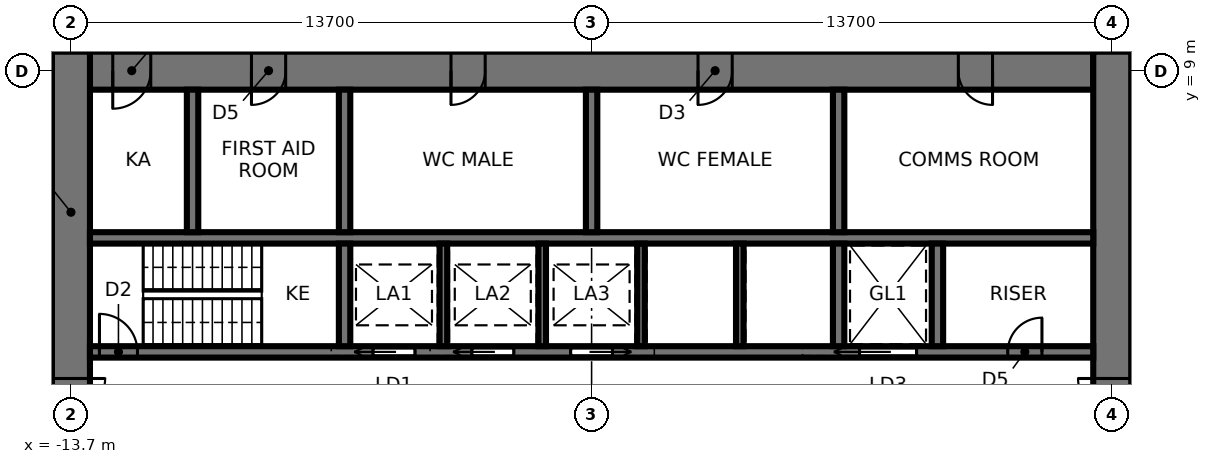
"""IFC4 building model, lengths in metres.
Left out: names, types, materials, properties, quantities, classifications, styles, units other than length and angle.
Written with IfcOpenShell. Run it as: python <this file> out.ifc"""

import sys

from ifc_helpers import new_model, si_unit, direction, frame, frame_2d, origin, place, context, subcontext, project, spatial, rectangle, extrude, element, fill, save


model = new_model("IFC4")
c1 = context("Model", 3, precision=1e-05, world=origin(), true_north=direction((0.0, 1.0)))
c2 = subcontext(c1, "Body", "Model", "MODEL_VIEW")
j1 = project(units=[si_unit("LENGTHUNIT", "METRE"), si_unit("PLANEANGLEUNIT", "RADIAN")], contexts=[c1])
p1 = place(None, origin())
s1 = spatial("IfcSite", under=j1, at=p1, CompositionType="ELEMENT")
p2 = place(p1, origin())
s2 = spatial("IfcBuilding", under=s1, at=p2, CompositionType="ELEMENT")
p3 = place(p2, frame((0.0, 0.0, 10.6)))
s3 = spatial("IfcBuildingStorey", under=s2, at=p3, CompositionType="ELEMENT", Elevation=10.6)
p4 = place(p3, frame((13.2, 9.0, 0.0), z_axis=(0.0, 0.0, 1.0), x_axis=(-1.0, 0.0, 0.0)))
e1 = element("IfcWall", 1, at=p4, inside=s3, PredefinedType="SHEAR", context=c2, shape_type="SweptSolid", body=[
    extrude(rectangle(XDim=26.4, YDim=1.0, at=frame_2d((13.2, 0.0))), origin(), (0.0, 0.0, 1.0), 4.5),
])
p5 = place(p4, frame((2.65, 0.0, 0.0)))
e2 = element("IfcOpeningElement", 2, at=p5, cuts=e1, PredefinedType="OPENING", context=c2, shape_type="SweptSolid", body=[
    extrude(rectangle(XDim=0.9, YDim=2.1, at=frame_2d((0.45, 1.05))), frame((0.0, 0.51, 0.0), z_axis=(0.0, -1.0, 0.0), x_axis=(1.0, 0.0, 0.0)), (0.0, 0.0, 1.0), 1.02),
])
p6 = place(p4, frame((9.5, 0.0, 0.0)))
e3 = element("IfcOpeningElement", 3, at=p6, cuts=e1, PredefinedType="OPENING", context=c2, shape_type="SweptSolid", body=[
    extrude(rectangle(XDim=0.9, YDim=2.1, at=frame_2d((0.45, 1.05))), frame((0.0, 0.51, 0.0), z_axis=(0.0, -1.0, 0.0), x_axis=(1.0, 0.0, 0.0)), (0.0, 0.0, 1.0), 1.02),
])
p7 = place(p4, frame((16.0, 0.0, 0.0)))
e4 = element("IfcOpeningElement", 4, at=p7, cuts=e1, PredefinedType="OPENING", context=c2, shape_type="SweptSolid", body=[
    extrude(rectangle(XDim=0.9, YDim=2.1, at=frame_2d((0.45, 1.05))), frame((0.0, 0.51, 0.0), z_axis=(0.0, -1.0, 0.0), x_axis=(1.0, 0.0, 0.0)), (0.0, 0.0, 1.0), 1.02),
])
p8 = place(p4, frame((21.25, 0.0, 0.0)))
e5 = element("IfcOpeningElement", 5, at=p8, cuts=e1, PredefinedType="OPENING", context=c2, shape_type="SweptSolid", body=[
    extrude(rectangle(XDim=0.9, YDim=2.1, at=frame_2d((0.45, 1.05))), frame((0.0, 0.51, 0.0), z_axis=(0.0, -1.0, 0.0), x_axis=(1.0, 0.0, 0.0)), (0.0, 0.0, 1.0), 1.02),
])
p9 = place(p4, frame((24.8, 0.0, 0.0)))
e6 = element("IfcOpeningElement", 6, at=p9, cuts=e1, PredefinedType="OPENING", context=c2, shape_type="SweptSolid", body=[
    extrude(rectangle(XDim=1.0, YDim=2.1, at=frame_2d((0.5, 1.05))), frame((0.0, 0.51, 0.0), z_axis=(0.0, -1.0, 0.0), x_axis=(1.0, 0.0, 0.0)), (0.0, 0.0, 1.0), 1.02),
])
p10 = place(p3, frame((13.7, -9.5, 0.0), z_axis=(0.0, 0.0, 1.0), x_axis=(0.0, 1.0, 0.0)))
e7 = element("IfcWall", 7, at=p10, inside=s3, PredefinedType="SHEAR", context=c2, shape_type="SweptSolid", body=[
    extrude(rectangle(XDim=19.0, YDim=1.0, at=frame_2d((9.5, 0.0))), origin(), (0.0, 0.0, 1.0), 4.5),
])
p11 = place(p10, frame((8.6, 0.0, 0.0)))
e8 = element("IfcOpeningElement", 8, at=p11, cuts=e7, PredefinedType="OPENING", context=c2, shape_type="SweptSolid", body=[
    extrude(rectangle(XDim=1.8, YDim=2.4, at=frame_2d((0.9, 1.2))), frame((0.0, 0.51, 0.0), z_axis=(0.0, -1.0, 0.0), x_axis=(1.0, 0.0, 0.0)), (0.0, 0.0, 1.0), 1.02),
])
p12 = place(p3, frame((-13.7, 9.5, 0.0), z_axis=(0.0, 0.0, 1.0), x_axis=(0.0, -1.0, 0.0)))
e9 = element("IfcWall", 9, at=p12, inside=s3, PredefinedType="SHEAR", context=c2, shape_type="SweptSolid", body=[
    extrude(rectangle(XDim=19.0, YDim=1.0, at=frame_2d((9.5, 0.0))), origin(), (0.0, 0.0, 1.0), 4.5),
])
p13 = place(p12, frame((8.6, 0.0, 0.0)))
e10 = element("IfcOpeningElement", 10, at=p13, cuts=e9, PredefinedType="OPENING", context=c2, shape_type="SweptSolid", body=[
    extrude(rectangle(XDim=1.8, YDim=2.4, at=frame_2d((0.9, 1.2))), frame((0.0, 0.51, 0.0), z_axis=(0.0, -1.0, 0.0), x_axis=(1.0, 0.0, 0.0)), (0.0, 0.0, 1.0), 1.02),
])
p14 = place(p3, frame((-13.2, 1.6, 0.0), z_axis=(0.0, 0.0, 1.0), x_axis=(1.0, 0.0, 0.0)))
e11 = element("IfcWall", 11, at=p14, inside=s3, PredefinedType="SHEAR", context=c2, shape_type="SweptSolid", body=[
    extrude(rectangle(XDim=26.4, YDim=0.3, at=frame_2d((13.2, 0.0))), origin(), (0.0, 0.0, 1.0), 4.5),
])
p15 = place(p14, frame((0.25, 0.0, 0.0)))
e12 = element("IfcOpeningElement", 12, at=p15, cuts=e11, PredefinedType="OPENING", context=c2, shape_type="SweptSolid", body=[
    extrude(rectangle(XDim=1.0, YDim=2.1, at=frame_2d((0.5, 1.05))), frame((0.0, 0.16, 0.0), z_axis=(0.0, -1.0, 0.0), x_axis=(1.0, 0.0, 0.0)), (0.0, 0.0, 1.0), 0.32),
])
p16 = place(p14, frame((20.25, 0.0, 0.0)))
e13 = element("IfcOpeningElement", 13, at=p16, cuts=e11, PredefinedType="OPENING", context=c2, shape_type="SweptSolid", body=[
    extrude(rectangle(XDim=1.5, YDim=2.4, at=frame_2d((0.75, 1.2))), frame((0.0, 0.16, 0.0), z_axis=(0.0, -1.0, 0.0), x_axis=(1.0, 0.0, 0.0)), (0.0, 0.0, 1.0), 0.32),
])
p17 = place(p14, frame((7.45, 0.0, 0.0)))
e14 = element("IfcOpeningElement", 14, at=p17, cuts=e11, PredefinedType="OPENING", context=c2, shape_type="SweptSolid", body=[
    extrude(rectangle(XDim=1.1, YDim=2.3, at=frame_2d((0.55, 1.15))), frame((0.0, 0.16, 0.0), z_axis=(0.0, -1.0, 0.0), x_axis=(1.0, 0.0, 0.0)), (0.0, 0.0, 1.0), 0.32),
])
p18 = place(p14, frame((10.05, 0.0, 0.0)))
e15 = element("IfcOpeningElement", 15, at=p18, cuts=e11, PredefinedType="OPENING", context=c2, shape_type="SweptSolid", body=[
    extrude(rectangle(XDim=1.1, YDim=2.3, at=frame_2d((0.55, 1.15))), frame((0.0, 0.16, 0.0), z_axis=(0.0, -1.0, 0.0), x_axis=(1.0, 0.0, 0.0)), (0.0, 0.0, 1.0), 0.32),
])
p19 = place(p14, frame((12.65, 0.0, 0.0)))
e16 = element("IfcOpeningElement", 16, at=p19, cuts=e11, PredefinedType="OPENING", context=c2, shape_type="SweptSolid", body=[
    extrude(rectangle(XDim=1.1, YDim=2.3, at=frame_2d((0.55, 1.15))), frame((0.0, 0.16, 0.0), z_axis=(0.0, -1.0, 0.0), x_axis=(1.0, 0.0, 0.0)), (0.0, 0.0, 1.0), 0.32),
])
p20 = place(p14, frame((24.15, 0.0, 0.0)))
e17 = element("IfcOpeningElement", 17, at=p20, cuts=e11, PredefinedType="OPENING", context=c2, shape_type="SweptSolid", body=[
    extrude(rectangle(XDim=0.9, YDim=2.1, at=frame_2d((0.45, 1.05))), frame((0.0, 0.16, 0.0), z_axis=(0.0, -1.0, 0.0), x_axis=(1.0, 0.0, 0.0)), (0.0, 0.0, 1.0), 0.32),
])
p21 = place(p3, frame((-13.2, 4.6, 0.0), z_axis=(0.0, 0.0, 1.0), x_axis=(1.0, 0.0, 0.0)))
e18 = element("IfcWall", 18, at=p21, inside=s3, PredefinedType="SHEAR", context=c2, shape_type="SweptSolid", body=[
    extrude(rectangle(XDim=26.4, YDim=0.3, at=frame_2d((13.2, 0.0))), origin(), (0.0, 0.0, 1.0), 4.5),
])
p22 = place(p3, frame((-6.5, 1.75, 0.0), z_axis=(0.0, 0.0, 1.0), x_axis=(0.0, 1.0, 0.0)))
e19 = element("IfcWall", 19, at=p22, inside=s3, PredefinedType="SHEAR", context=c2, shape_type="SweptSolid", body=[
    extrude(rectangle(XDim=2.7, YDim=0.3, at=frame_2d((1.35, 0.0))), origin(), (0.0, 0.0, 1.0), 4.5),
])
p23 = place(p3, frame((-6.5, 4.75, 0.0), z_axis=(0.0, 0.0, 1.0), x_axis=(0.0, 1.0, 0.0)))
e20 = element("IfcWall", 20, at=p23, inside=s3, PredefinedType="SHEAR", context=c2, shape_type="SweptSolid", body=[
    extrude(rectangle(XDim=3.75, YDim=0.3, at=frame_2d((1.875, 0.0))), origin(), (0.0, 0.0, 1.0), 4.5),
])
p24 = place(p3, frame((6.5, 1.75, 0.0), z_axis=(0.0, 0.0, 1.0), x_axis=(0.0, 1.0, 0.0)))
e21 = element("IfcWall", 21, at=p24, inside=s3, PredefinedType="SHEAR", context=c2, shape_type="SweptSolid", body=[
    extrude(rectangle(XDim=2.7, YDim=0.3, at=frame_2d((1.35, 0.0))), origin(), (0.0, 0.0, 1.0), 4.5),
])
p25 = place(p3, frame((6.5, 4.75, 0.0), z_axis=(0.0, 0.0, 1.0), x_axis=(0.0, 1.0, 0.0)))
e22 = element("IfcWall", 22, at=p25, inside=s3, PredefinedType="SHEAR", context=c2, shape_type="SweptSolid", body=[
    extrude(rectangle(XDim=3.75, YDim=0.3, at=frame_2d((1.875, 0.0))), origin(), (0.0, 0.0, 1.0), 4.5),
])
for number, where, z_axis, x_axis in (
    (23, (-3.9, 1.75, 0.0), (0.0, 0.0, 1.0), (0.0, 1.0, 0.0)),
    (24, (-1.3, 1.75, 0.0), (0.0, 0.0, 1.0), (0.0, 1.0, 0.0)),
    (25, (1.3, 1.75, 0.0), (0.0, 0.0, 1.0), (0.0, 1.0, 0.0)),
    (26, (3.9, 1.75, 0.0), (0.0, 0.0, 1.0), (0.0, 1.0, 0.0)),
):
    element("IfcWall", number, at=place(p3, frame(where, z_axis=z_axis, x_axis=x_axis)), inside=s3, PredefinedType="SHEAR", context=c2, shape_type="SweptSolid", body=[
        extrude(rectangle(XDim=2.7, YDim=0.2, at=frame_2d((1.35, 0.0))), origin(), (0.0, 0.0, 1.0), 4.5),
    ])
for number, where, z_axis, x_axis in (
    (27, (0.0, 4.75, 0.0), (0.0, 0.0, 1.0), (0.0, 1.0, 0.0)),
    (28, (-10.5, 4.75, 0.0), (0.0, 0.0, 1.0), (0.0, 1.0, 0.0)),
):
    element("IfcWall", number, at=place(p3, frame(where, z_axis=z_axis, x_axis=x_axis)), inside=s3, PredefinedType="SHEAR", context=c2, shape_type="SweptSolid", body=[
        extrude(rectangle(XDim=3.75, YDim=0.3, at=frame_2d((1.875, 0.0))), origin(), (0.0, 0.0, 1.0), 4.5),
    ])
p26 = place(p3, frame((9.1, 1.75, 0.0), z_axis=(0.0, 0.0, 1.0), x_axis=(0.0, 1.0, 0.0)))
e29 = element("IfcWall", 29, at=p26, inside=s3, PredefinedType="SHEAR", context=c2, shape_type="SweptSolid", body=[
    extrude(rectangle(XDim=2.7, YDim=0.3, at=frame_2d((1.35, 0.0))), origin(), (0.0, 0.0, 1.0), 4.5),
])
p27 = place(p13, origin())
e30 = element("IfcDoor", 30, at=p27, inside=s3, OperationType="DOUBLE_DOOR_SINGLE_SWING", PredefinedType="DOOR", context=c2, shape_type="SweptSolid", body=[
    extrude(rectangle(XDim=1.72, YDim=2.36, at=frame_2d((0.9, 1.18))), frame((0.0, 0.025, 0.0), z_axis=(0.0, -1.0, 0.0), x_axis=(1.0, 0.0, 0.0)), (0.0, 0.0, 1.0), 0.05),
    extrude(rectangle(XDim=0.04, YDim=2.4, at=frame_2d((0.02, 1.2))), frame((0.0, 0.25, 0.0), z_axis=(0.0, -1.0, 0.0), x_axis=(1.0, 0.0, 0.0)), (0.0, 0.0, 1.0), 0.5),
    extrude(rectangle(XDim=0.04, YDim=2.4, at=frame_2d((1.78, 1.2))), frame((0.0, 0.25, 0.0), z_axis=(0.0, -1.0, 0.0), x_axis=(1.0, 0.0, 0.0)), (0.0, 0.0, 1.0), 0.5),
    extrude(rectangle(XDim=1.72, YDim=0.04, at=frame_2d((0.9, 2.38))), frame((0.0, 0.25, 0.0), z_axis=(0.0, -1.0, 0.0), x_axis=(1.0, 0.0, 0.0)), (0.0, 0.0, 1.0), 0.5),
])
fill(e10, e30)
p28 = place(p11, origin())
e31 = element("IfcDoor", 31, at=p28, inside=s3, OperationType="DOUBLE_DOOR_SINGLE_SWING", PredefinedType="DOOR", context=c2, shape_type="SweptSolid", body=[
    extrude(rectangle(XDim=1.72, YDim=2.36, at=frame_2d((0.9, 1.18))), frame((0.0, 0.025, 0.0), z_axis=(0.0, -1.0, 0.0), x_axis=(1.0, 0.0, 0.0)), (0.0, 0.0, 1.0), 0.05),
    extrude(rectangle(XDim=0.04, YDim=2.4, at=frame_2d((0.02, 1.2))), frame((0.0, 0.25, 0.0), z_axis=(0.0, -1.0, 0.0), x_axis=(1.0, 0.0, 0.0)), (0.0, 0.0, 1.0), 0.5),
    extrude(rectangle(XDim=0.04, YDim=2.4, at=frame_2d((1.78, 1.2))), frame((0.0, 0.25, 0.0), z_axis=(0.0, -1.0, 0.0), x_axis=(1.0, 0.0, 0.0)), (0.0, 0.0, 1.0), 0.5),
    extrude(rectangle(XDim=1.72, YDim=0.04, at=frame_2d((0.9, 2.38))), frame((0.0, 0.25, 0.0), z_axis=(0.0, -1.0, 0.0), x_axis=(1.0, 0.0, 0.0)), (0.0, 0.0, 1.0), 0.5),
])
fill(e8, e31)
p29 = place(p15, origin())
e32 = element("IfcDoor", 32, at=p29, inside=s3, OperationType="SINGLE_SWING_LEFT", PredefinedType="DOOR", context=c2, shape_type="SweptSolid", body=[
    extrude(rectangle(XDim=1.0, YDim=2.1, at=frame_2d((0.5, 1.05))), frame((0.0, 0.025, 0.0), z_axis=(0.0, -1.0, 0.0), x_axis=(1.0, 0.0, 0.0)), (0.0, 0.0, 1.0), 0.05),
])
fill(e12, e32)
p30 = place(p16, origin())
e33 = element("IfcDoor", 33, at=p30, inside=s3, OperationType="SLIDING_TO_LEFT", PredefinedType="DOOR", context=c2, shape_type="SweptSolid", body=[
    extrude(rectangle(XDim=1.5, YDim=2.4, at=frame_2d((0.75, 1.2))), frame((0.0, 0.025, 0.0), z_axis=(0.0, -1.0, 0.0), x_axis=(1.0, 0.0, 0.0)), (0.0, 0.0, 1.0), 0.05),
])
fill(e13, e33)
p31 = place(p17, origin())
e34 = element("IfcDoor", 34, at=p31, inside=s3, OperationType="SLIDING_TO_LEFT", PredefinedType="DOOR", context=c2, shape_type="SweptSolid", body=[
    extrude(rectangle(XDim=1.1, YDim=2.3, at=frame_2d((0.55, 1.15))), frame((0.0, 0.025, 0.0), z_axis=(0.0, -1.0, 0.0), x_axis=(1.0, 0.0, 0.0)), (0.0, 0.0, 1.0), 0.05),
])
fill(e14, e34)
p32 = place(p18, origin())
e35 = element("IfcDoor", 35, at=p32, inside=s3, OperationType="SLIDING_TO_LEFT", PredefinedType="DOOR", context=c2, shape_type="SweptSolid", body=[
    extrude(rectangle(XDim=1.1, YDim=2.3, at=frame_2d((0.55, 1.15))), frame((0.0, 0.025, 0.0), z_axis=(0.0, -1.0, 0.0), x_axis=(1.0, 0.0, 0.0)), (0.0, 0.0, 1.0), 0.05),
])
fill(e15, e35)
p33 = place(p19, origin())
e36 = element("IfcDoor", 36, at=p33, inside=s3, OperationType="SLIDING_TO_RIGHT", PredefinedType="DOOR", context=c2, shape_type="SweptSolid", body=[
    extrude(rectangle(XDim=1.1, YDim=2.3, at=frame_2d((0.55, 1.15))), frame((0.0, 0.025, 0.0), z_axis=(0.0, -1.0, 0.0), x_axis=(1.0, 0.0, 0.0)), (0.0, 0.0, 1.0), 0.05),
])
fill(e16, e36)
p34 = place(p20, origin())
e37 = element("IfcDoor", 37, at=p34, inside=s3, OperationType="SINGLE_SWING_RIGHT", PredefinedType="DOOR", context=c2, shape_type="SweptSolid", body=[
    extrude(rectangle(XDim=0.9, YDim=2.1, at=frame_2d((0.45, 1.05))), frame((0.0, 0.025, 0.0), z_axis=(0.0, -1.0, 0.0), x_axis=(1.0, 0.0, 0.0)), (0.0, 0.0, 1.0), 0.05),
])
fill(e17, e37)
p35 = place(p5, origin())
e38 = element("IfcDoor", 38, at=p35, inside=s3, OperationType="SINGLE_SWING_LEFT", PredefinedType="DOOR", context=c2, shape_type="SweptSolid", body=[
    extrude(rectangle(XDim=0.82, YDim=2.06, at=frame_2d((0.45, 1.03))), frame((0.0, 0.025, 0.0), z_axis=(0.0, -1.0, 0.0), x_axis=(1.0, 0.0, 0.0)), (0.0, 0.0, 1.0), 0.05),
    extrude(rectangle(XDim=0.04, YDim=2.1, at=frame_2d((0.02, 1.05))), frame((0.0, 0.25, 0.0), z_axis=(0.0, -1.0, 0.0), x_axis=(1.0, 0.0, 0.0)), (0.0, 0.0, 1.0), 0.5),
    extrude(rectangle(XDim=0.04, YDim=2.1, at=frame_2d((0.88, 1.05))), frame((0.0, 0.25, 0.0), z_axis=(0.0, -1.0, 0.0), x_axis=(1.0, 0.0, 0.0)), (0.0, 0.0, 1.0), 0.5),
    extrude(rectangle(XDim=0.82, YDim=0.04, at=frame_2d((0.45, 2.08))), frame((0.0, 0.25, 0.0), z_axis=(0.0, -1.0, 0.0), x_axis=(1.0, 0.0, 0.0)), (0.0, 0.0, 1.0), 0.5),
])
fill(e2, e38)
p36 = place(p6, origin())
e39 = element("IfcDoor", 39, at=p36, inside=s3, OperationType="SINGLE_SWING_RIGHT", PredefinedType="DOOR", context=c2, shape_type="SweptSolid", body=[
    extrude(rectangle(XDim=0.82, YDim=2.06, at=frame_2d((0.45, 1.03))), frame((0.0, 0.025, 0.0), z_axis=(0.0, -1.0, 0.0), x_axis=(1.0, 0.0, 0.0)), (0.0, 0.0, 1.0), 0.05),
    extrude(rectangle(XDim=0.04, YDim=2.1, at=frame_2d((0.02, 1.05))), frame((0.0, 0.25, 0.0), z_axis=(0.0, -1.0, 0.0), x_axis=(1.0, 0.0, 0.0)), (0.0, 0.0, 1.0), 0.5),
    extrude(rectangle(XDim=0.04, YDim=2.1, at=frame_2d((0.88, 1.05))), frame((0.0, 0.25, 0.0), z_axis=(0.0, -1.0, 0.0), x_axis=(1.0, 0.0, 0.0)), (0.0, 0.0, 1.0), 0.5),
    extrude(rectangle(XDim=0.82, YDim=0.04, at=frame_2d((0.45, 2.08))), frame((0.0, 0.25, 0.0), z_axis=(0.0, -1.0, 0.0), x_axis=(1.0, 0.0, 0.0)), (0.0, 0.0, 1.0), 0.5),
])
fill(e3, e39)
p37 = place(p7, origin())
e40 = element("IfcDoor", 40, at=p37, inside=s3, OperationType="SINGLE_SWING_RIGHT", PredefinedType="DOOR", context=c2, shape_type="SweptSolid", body=[
    extrude(rectangle(XDim=0.82, YDim=2.06, at=frame_2d((0.45, 1.03))), frame((0.0, 0.025, 0.0), z_axis=(0.0, -1.0, 0.0), x_axis=(1.0, 0.0, 0.0)), (0.0, 0.0, 1.0), 0.05),
    extrude(rectangle(XDim=0.04, YDim=2.1, at=frame_2d((0.02, 1.05))), frame((0.0, 0.25, 0.0), z_axis=(0.0, -1.0, 0.0), x_axis=(1.0, 0.0, 0.0)), (0.0, 0.0, 1.0), 0.5),
    extrude(rectangle(XDim=0.04, YDim=2.1, at=frame_2d((0.88, 1.05))), frame((0.0, 0.25, 0.0), z_axis=(0.0, -1.0, 0.0), x_axis=(1.0, 0.0, 0.0)), (0.0, 0.0, 1.0), 0.5),
    extrude(rectangle(XDim=0.82, YDim=0.04, at=frame_2d((0.45, 2.08))), frame((0.0, 0.25, 0.0), z_axis=(0.0, -1.0, 0.0), x_axis=(1.0, 0.0, 0.0)), (0.0, 0.0, 1.0), 0.5),
])
fill(e4, e40)
p38 = place(p8, origin())
e41 = element("IfcDoor", 41, at=p38, inside=s3, OperationType="SINGLE_SWING_RIGHT", PredefinedType="DOOR", context=c2, shape_type="SweptSolid", body=[
    extrude(rectangle(XDim=0.82, YDim=2.06, at=frame_2d((0.45, 1.03))), frame((0.0, 0.025, 0.0), z_axis=(0.0, -1.0, 0.0), x_axis=(1.0, 0.0, 0.0)), (0.0, 0.0, 1.0), 0.05),
    extrude(rectangle(XDim=0.04, YDim=2.1, at=frame_2d((0.02, 1.05))), frame((0.0, 0.25, 0.0), z_axis=(0.0, -1.0, 0.0), x_axis=(1.0, 0.0, 0.0)), (0.0, 0.0, 1.0), 0.5),
    extrude(rectangle(XDim=0.04, YDim=2.1, at=frame_2d((0.88, 1.05))), frame((0.0, 0.25, 0.0), z_axis=(0.0, -1.0, 0.0), x_axis=(1.0, 0.0, 0.0)), (0.0, 0.0, 1.0), 0.5),
    extrude(rectangle(XDim=0.82, YDim=0.04, at=frame_2d((0.45, 2.08))), frame((0.0, 0.25, 0.0), z_axis=(0.0, -1.0, 0.0), x_axis=(1.0, 0.0, 0.0)), (0.0, 0.0, 1.0), 0.5),
])
fill(e5, e41)
p39 = place(p9, origin())
e42 = element("IfcDoor", 42, at=p39, inside=s3, OperationType="SINGLE_SWING_RIGHT", PredefinedType="DOOR", context=c2, shape_type="SweptSolid", body=[
    extrude(rectangle(XDim=0.92, YDim=2.06, at=frame_2d((0.5, 1.03))), frame((0.0, 0.025, 0.0), z_axis=(0.0, -1.0, 0.0), x_axis=(1.0, 0.0, 0.0)), (0.0, 0.0, 1.0), 0.05),
    extrude(rectangle(XDim=0.04, YDim=2.1, at=frame_2d((0.02, 1.05))), frame((0.0, 0.25, 0.0), z_axis=(0.0, -1.0, 0.0), x_axis=(1.0, 0.0, 0.0)), (0.0, 0.0, 1.0), 0.5),
    extrude(rectangle(XDim=0.04, YDim=2.1, at=frame_2d((0.98, 1.05))), frame((0.0, 0.25, 0.0), z_axis=(0.0, -1.0, 0.0), x_axis=(1.0, 0.0, 0.0)), (0.0, 0.0, 1.0), 0.5),
    extrude(rectangle(XDim=0.92, YDim=0.04, at=frame_2d((0.5, 2.08))), frame((0.0, 0.25, 0.0), z_axis=(0.0, -1.0, 0.0), x_axis=(1.0, 0.0, 0.0)), (0.0, 0.0, 1.0), 0.5),
])
fill(e6, e42)
save(model, sys.argv[1])
